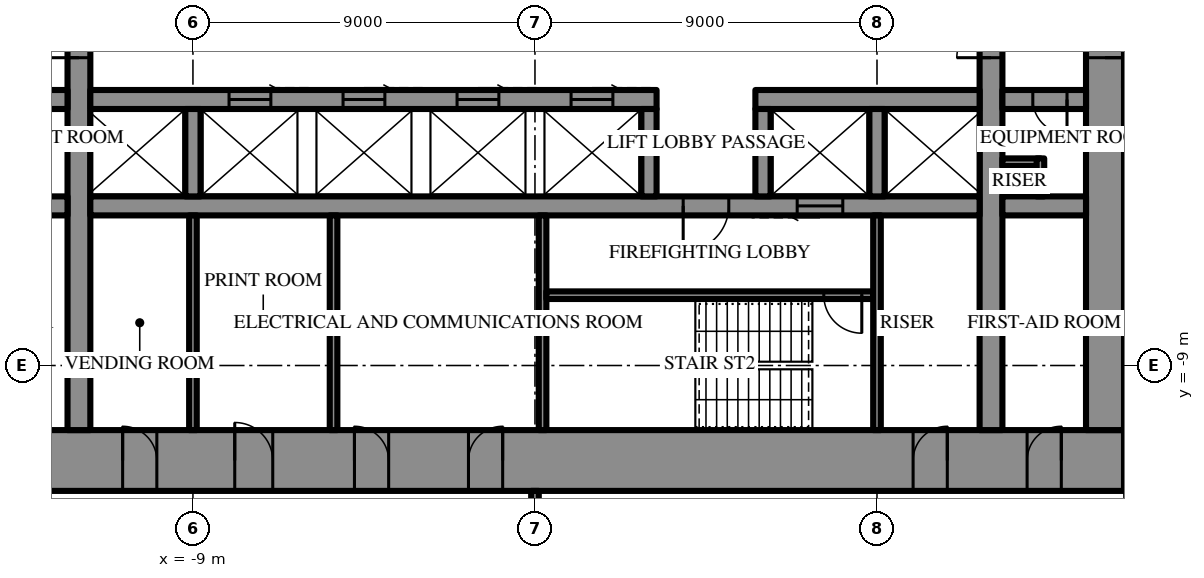
"""IFC4 building model, lengths in metres.
Left out: names, types, materials, properties, quantities, classifications, styles, units other than length and angle.
Written with IfcOpenShell. Run it as: python <this file> out.ifc"""

import sys

from ifc_helpers import new_model, si_unit, direction, frame, frame_2d, origin, place, context, subcontext, project, spatial, rectangle, extrude, element, fill, save


model = new_model("IFC4")
c1 = context("Model", 3, precision=1e-05, world=origin(), true_north=direction((0.0, 1.0)))
c2 = subcontext(c1, "Body", "Model", "MODEL_VIEW")
j1 = project(units=[si_unit("LENGTHUNIT", "METRE"), si_unit("PLANEANGLEUNIT", "RADIAN")], contexts=[c1])
p1 = place(None, origin())
s1 = spatial("IfcSite", under=j1, at=p1, CompositionType="ELEMENT")
p2 = place(p1, origin())
s2 = spatial("IfcBuilding", under=s1, at=p2, CompositionType="ELEMENT")
p3 = place(p2, frame((0.0, 0.0, 261.7)))
s3 = spatial("IfcBuildingStorey", under=s2, at=p3, CompositionType="ELEMENT", Elevation=261.7)
p4 = place(p3, frame((15.5, -11.5, 0.0), z_axis=(0.0, 0.0, 1.0), x_axis=(-1.0, 0.0, 0.0)))
e1 = element("IfcWall", 1, at=p4, inside=s3, PredefinedType="SHEAR", context=c2, shape_type="SweptSolid", body=[
    extrude(rectangle(XDim=31.0, YDim=1.6, at=frame_2d((15.5, 0.0))), origin(), (0.0, 0.0, 1.0), 4.2),
])
p5 = place(p4, frame((16.35, 0.0, 0.0)))
e2 = element("IfcOpeningElement", 2, at=p5, cuts=e1, PredefinedType="OPENING", context=c2, shape_type="SweptSolid", body=[
    extrude(rectangle(XDim=0.9, YDim=2.2, at=frame_2d((0.45, 1.1))), frame((0.0, 0.81, 0.0), z_axis=(0.0, -1.0, 0.0), x_axis=(1.0, 0.0, 0.0)), (0.0, 0.0, 1.0), 1.62),
])
p6 = place(p4, frame((19.35, 0.0, 0.0)))
e3 = element("IfcOpeningElement", 3, at=p6, cuts=e1, PredefinedType="OPENING", context=c2, shape_type="SweptSolid", body=[
    extrude(rectangle(XDim=0.9, YDim=2.2, at=frame_2d((0.45, 1.1))), frame((0.0, 0.81, 0.0), z_axis=(0.0, -1.0, 0.0), x_axis=(1.0, 0.0, 0.0)), (0.0, 0.0, 1.0), 1.62),
])
p7 = place(p4, frame((22.4, 0.0, 0.0)))
e4 = element("IfcOpeningElement", 4, at=p7, cuts=e1, PredefinedType="OPENING", context=c2, shape_type="SweptSolid", body=[
    extrude(rectangle(XDim=1.0, YDim=2.2, at=frame_2d((0.5, 1.1))), frame((0.0, 0.81, 0.0), z_axis=(0.0, -1.0, 0.0), x_axis=(1.0, 0.0, 0.0)), (0.0, 0.0, 1.0), 1.62),
])
p8 = place(p4, frame((1.65, 0.0, 0.0)))
e5 = element("IfcOpeningElement", 5, at=p8, cuts=e1, PredefinedType="OPENING", context=c2, shape_type="SweptSolid", body=[
    extrude(rectangle(XDim=0.9, YDim=2.2, at=frame_2d((0.45, 1.1))), frame((0.0, 0.81, 0.0), z_axis=(0.0, -1.0, 0.0), x_axis=(1.0, 0.0, 0.0)), (0.0, 0.0, 1.0), 1.62),
])
p9 = place(p4, frame((4.65, 0.0, 0.0)))
e6 = element("IfcOpeningElement", 6, at=p9, cuts=e1, PredefinedType="OPENING", context=c2, shape_type="SweptSolid", body=[
    extrude(rectangle(XDim=0.9, YDim=2.2, at=frame_2d((0.45, 1.1))), frame((0.0, 0.81, 0.0), z_axis=(0.0, -1.0, 0.0), x_axis=(1.0, 0.0, 0.0)), (0.0, 0.0, 1.0), 1.62),
])
p10 = place(p4, frame((25.45, 0.0, 0.0)))
e7 = element("IfcOpeningElement", 7, at=p10, cuts=e1, PredefinedType="OPENING", context=c2, shape_type="SweptSolid", body=[
    extrude(rectangle(XDim=0.9, YDim=2.2, at=frame_2d((0.45, 1.1))), frame((0.0, 0.81, 0.0), z_axis=(0.0, -1.0, 0.0), x_axis=(1.0, 0.0, 0.0)), (0.0, 0.0, 1.0), 1.62),
])
p11 = place(p4, frame((28.45, 0.0, 0.0)))
e8 = element("IfcOpeningElement", 8, at=p11, cuts=e1, PredefinedType="OPENING", context=c2, shape_type="SweptSolid", body=[
    extrude(rectangle(XDim=0.9, YDim=2.2, at=frame_2d((0.45, 1.1))), frame((0.0, 0.81, 0.0), z_axis=(0.0, -1.0, 0.0), x_axis=(1.0, 0.0, 0.0)), (0.0, 0.0, 1.0), 1.62),
])
p12 = place(p3, frame((15.0, -10.7, 0.0), z_axis=(0.0, 0.0, 1.0), x_axis=(0.0, 1.0, 0.0)))
e9 = element("IfcWall", 9, at=p12, inside=s3, PredefinedType="SHEAR", context=c2, shape_type="SweptSolid", body=[
    extrude(rectangle(XDim=21.4, YDim=1.0, at=frame_2d((10.7, 0.0))), origin(), (0.0, 0.0, 1.0), 4.2),
])
p13 = place(p12, frame((9.8, 0.0, 0.0)))
e10 = element("IfcOpeningElement", 10, at=p13, cuts=e9, PredefinedType="OPENING", context=c2, shape_type="SweptSolid", body=[
    extrude(rectangle(XDim=1.8, YDim=2.4, at=frame_2d((0.9, 1.2))), frame((0.0, 0.51, 0.0), z_axis=(0.0, -1.0, 0.0), x_axis=(1.0, 0.0, 0.0)), (0.0, 0.0, 1.0), 1.02),
])
p14 = place(p3, frame((12.0, -10.7, 0.0), z_axis=(0.0, 0.0, 1.0), x_axis=(0.0, 1.0, 0.0)))
e11 = element("IfcWall", 11, at=p14, inside=s3, PredefinedType="SHEAR", context=c2, shape_type="SweptSolid", body=[
    extrude(rectangle(XDim=21.4, YDim=0.6, at=frame_2d((10.7, 0.0))), origin(), (0.0, 0.0, 1.0), 4.2),
])
p15 = place(p14, frame((9.8, 0.0, 0.0)))
e12 = element("IfcOpeningElement", 12, at=p15, cuts=e11, PredefinedType="OPENING", context=c2, shape_type="SweptSolid", body=[
    extrude(rectangle(XDim=1.8, YDim=2.4, at=frame_2d((0.9, 1.2))), frame((0.0, 0.31, 0.0), z_axis=(0.0, -1.0, 0.0), x_axis=(1.0, 0.0, 0.0)), (0.0, 0.0, 1.0), 0.62),
])
p16 = place(p3, frame((-12.0, -10.7, 0.0), z_axis=(0.0, 0.0, 1.0), x_axis=(0.0, 1.0, 0.0)))
e13 = element("IfcWall", 13, at=p16, inside=s3, PredefinedType="SHEAR", context=c2, shape_type="SweptSolid", body=[
    extrude(rectangle(XDim=21.4, YDim=0.6, at=frame_2d((10.7, 0.0))), origin(), (0.0, 0.0, 1.0), 4.2),
])
p17 = place(p16, frame((9.8, 0.0, 0.0)))
e14 = element("IfcOpeningElement", 14, at=p17, cuts=e13, PredefinedType="OPENING", context=c2, shape_type="SweptSolid", body=[
    extrude(rectangle(XDim=1.8, YDim=2.4, at=frame_2d((0.9, 1.2))), frame((0.0, 0.31, 0.0), z_axis=(0.0, -1.0, 0.0), x_axis=(1.0, 0.0, 0.0)), (0.0, 0.0, 1.0), 0.62),
])
p18 = place(p3, frame((14.5, -2.0, 0.0), z_axis=(0.0, 0.0, 1.0), x_axis=(-1.0, 0.0, 0.0)))
e15 = element("IfcWall", 15, at=p18, inside=s3, PredefinedType="SHEAR", context=c2, shape_type="SweptSolid", body=[
    extrude(rectangle(XDim=2.2, YDim=0.5, at=frame_2d((1.1, 0.0))), origin(), (0.0, 0.0, 1.0), 4.2),
])
p19 = place(p18, frame((0.5, 0.0, 0.0)))
e16 = element("IfcOpeningElement", 16, at=p19, cuts=e15, PredefinedType="OPENING", context=c2, shape_type="SweptSolid", body=[
    extrude(rectangle(XDim=0.9, YDim=2.2, at=frame_2d((0.45, 1.1))), frame((0.0, 0.26, 0.0), z_axis=(0.0, -1.0, 0.0), x_axis=(1.0, 0.0, 0.0)), (0.0, 0.0, 1.0), 0.52),
])
p20 = place(p3, frame((11.7, -2.0, 0.0), z_axis=(0.0, 0.0, 1.0), x_axis=(-1.0, 0.0, 0.0)))
e17 = element("IfcWall", 17, at=p20, inside=s3, PredefinedType="SHEAR", context=c2, shape_type="SweptSolid", body=[
    extrude(rectangle(XDim=5.9, YDim=0.5, at=frame_2d((2.95, 0.0))), origin(), (0.0, 0.0, 1.0), 4.2),
])
p21 = place(p3, frame((3.2, -2.0, 0.0), z_axis=(0.0, 0.0, 1.0), x_axis=(-1.0, 0.0, 0.0)))
e18 = element("IfcWall", 18, at=p21, inside=s3, PredefinedType="SHEAR", context=c2, shape_type="SweptSolid", body=[
    extrude(rectangle(XDim=14.9, YDim=0.5, at=frame_2d((7.45, 0.0))), origin(), (0.0, 0.0, 1.0), 4.2),
])
p22 = place(p21, frame((1.15, 0.0, 0.0)))
e19 = element("IfcOpeningElement", 19, at=p22, cuts=e18, PredefinedType="OPENING", context=c2, shape_type="SweptSolid", body=[
    extrude(rectangle(XDim=1.1, YDim=2.2, at=frame_2d((0.55, 1.1))), frame((0.0, 0.26, 0.0), z_axis=(0.0, -1.0, 0.0), x_axis=(1.0, 0.0, 0.0)), (0.0, 0.0, 1.0), 0.52),
])
p23 = place(p21, frame((4.15, 0.0, 0.0)))
e20 = element("IfcOpeningElement", 20, at=p23, cuts=e18, PredefinedType="OPENING", context=c2, shape_type="SweptSolid", body=[
    extrude(rectangle(XDim=1.1, YDim=2.2, at=frame_2d((0.55, 1.1))), frame((0.0, 0.26, 0.0), z_axis=(0.0, -1.0, 0.0), x_axis=(1.0, 0.0, 0.0)), (0.0, 0.0, 1.0), 0.52),
])
p24 = place(p21, frame((7.15, 0.0, 0.0)))
e21 = element("IfcOpeningElement", 21, at=p24, cuts=e18, PredefinedType="OPENING", context=c2, shape_type="SweptSolid", body=[
    extrude(rectangle(XDim=1.1, YDim=2.2, at=frame_2d((0.55, 1.1))), frame((0.0, 0.26, 0.0), z_axis=(0.0, -1.0, 0.0), x_axis=(1.0, 0.0, 0.0)), (0.0, 0.0, 1.0), 0.52),
])
p25 = place(p21, frame((10.15, 0.0, 0.0)))
e22 = element("IfcOpeningElement", 22, at=p25, cuts=e18, PredefinedType="OPENING", context=c2, shape_type="SweptSolid", body=[
    extrude(rectangle(XDim=1.1, YDim=2.2, at=frame_2d((0.55, 1.1))), frame((0.0, 0.26, 0.0), z_axis=(0.0, -1.0, 0.0), x_axis=(1.0, 0.0, 0.0)), (0.0, 0.0, 1.0), 0.52),
])
p26 = place(p3, frame((-12.3, -2.0, 0.0), z_axis=(0.0, 0.0, 1.0), x_axis=(-1.0, 0.0, 0.0)))
e23 = element("IfcWall", 23, at=p26, inside=s3, PredefinedType="SHEAR", context=c2, shape_type="SweptSolid", body=[
    extrude(rectangle(XDim=2.2, YDim=0.5, at=frame_2d((1.1, 0.0))), origin(), (0.0, 0.0, 1.0), 4.2),
])
p27 = place(p26, frame((0.8, 0.0, 0.0)))
e24 = element("IfcOpeningElement", 24, at=p27, cuts=e23, PredefinedType="OPENING", context=c2, shape_type="SweptSolid", body=[
    extrude(rectangle(XDim=0.9, YDim=2.2, at=frame_2d((0.45, 1.1))), frame((0.0, 0.26, 0.0), z_axis=(0.0, -1.0, 0.0), x_axis=(1.0, 0.0, 0.0)), (0.0, 0.0, 1.0), 0.52),
])
p28 = place(p3, frame((14.5, -4.8, 0.0), z_axis=(0.0, 0.0, 1.0), x_axis=(-1.0, 0.0, 0.0)))
e25 = element("IfcWall", 25, at=p28, inside=s3, PredefinedType="SHEAR", context=c2, shape_type="SweptSolid", body=[
    extrude(rectangle(XDim=2.2, YDim=0.5, at=frame_2d((1.1, 0.0))), origin(), (0.0, 0.0, 1.0), 4.2),
])
p29 = place(p3, frame((11.7, -4.8, 0.0), z_axis=(0.0, 0.0, 1.0), x_axis=(-1.0, 0.0, 0.0)))
e26 = element("IfcWall", 26, at=p29, inside=s3, PredefinedType="SHEAR", context=c2, shape_type="SweptSolid", body=[
    extrude(rectangle(XDim=23.4, YDim=0.5, at=frame_2d((11.7, 0.0))), origin(), (0.0, 0.0, 1.0), 4.2),
])
p30 = place(p29, frame((6.6, 0.0, 0.0)))
e27 = element("IfcOpeningElement", 27, at=p30, cuts=e26, PredefinedType="OPENING", context=c2, shape_type="SweptSolid", body=[
    extrude(rectangle(XDim=1.2, YDim=2.2, at=frame_2d((0.6, 1.1))), frame((0.0, 0.26, 0.0), z_axis=(0.0, -1.0, 0.0), x_axis=(1.0, 0.0, 0.0)), (0.0, 0.0, 1.0), 0.52),
])
p31 = place(p29, frame((3.6, 0.0, 0.0)))
e28 = element("IfcOpeningElement", 28, at=p31, cuts=e26, PredefinedType="OPENING", context=c2, shape_type="SweptSolid", body=[
    extrude(rectangle(XDim=1.2, YDim=2.2, at=frame_2d((0.6, 1.1))), frame((0.0, 0.26, 0.0), z_axis=(0.0, -1.0, 0.0), x_axis=(1.0, 0.0, 0.0)), (0.0, 0.0, 1.0), 0.52),
])
p32 = place(p3, frame((-12.3, -4.8, 0.0), z_axis=(0.0, 0.0, 1.0), x_axis=(-1.0, 0.0, 0.0)))
e29 = element("IfcWall", 29, at=p32, inside=s3, PredefinedType="SHEAR", context=c2, shape_type="SweptSolid", body=[
    extrude(rectangle(XDim=2.2, YDim=0.5, at=frame_2d((1.1, 0.0))), origin(), (0.0, 0.0, 1.0), 4.2),
])
for number, where, z_axis, x_axis in (
    (30, (9.0, -2.25, 0.0), (0.0, 0.0, 1.0), (0.0, -1.0, 0.0)),
    (31, (6.0, -2.25, 0.0), (0.0, 0.0, 1.0), (0.0, -1.0, 0.0)),
    (32, (3.0, -2.25, 0.0), (0.0, 0.0, 1.0), (0.0, -1.0, 0.0)),
    (33, (-9.0, -2.25, 0.0), (0.0, 0.0, 1.0), (0.0, -1.0, 0.0)),
):
    element("IfcWall", number, at=place(p3, frame(where, z_axis=z_axis, x_axis=x_axis)), inside=s3, PredefinedType="SHEAR", context=c2, shape_type="SweptSolid", body=[
        extrude(rectangle(XDim=2.3, YDim=0.4, at=frame_2d((1.15, 0.0))), origin(), (0.0, 0.0, 1.0), 4.2),
    ])
p33 = place(p3, frame((0.2, -5.05, 0.0), z_axis=(0.0, 0.0, 1.0), x_axis=(0.0, -1.0, 0.0)))
e34 = element("IfcWall", 34, at=p33, inside=s3, PredefinedType="SHEAR", context=c2, shape_type="SweptSolid", body=[
    extrude(rectangle(XDim=5.65, YDim=0.2, at=frame_2d((2.825, 0.0))), origin(), (0.0, 0.0, 1.0), 4.2),
])
p34 = place(p3, frame((8.9, -7.15, 0.0), z_axis=(0.0, 0.0, 1.0), x_axis=(-1.0, 0.0, 0.0)))
e35 = element("IfcWall", 35, at=p34, inside=s3, PredefinedType="SHEAR", context=c2, shape_type="SweptSolid", body=[
    extrude(rectangle(XDim=8.6, YDim=0.2, at=frame_2d((4.3, 0.0))), origin(), (0.0, 0.0, 1.0), 4.2),
])
p35 = place(p34, frame((0.3, 0.0, 0.0)))
e36 = element("IfcOpeningElement", 36, at=p35, cuts=e35, PredefinedType="OPENING", context=c2, shape_type="SweptSolid", body=[
    extrude(rectangle(XDim=1.0, YDim=2.2, at=frame_2d((0.5, 1.1))), frame((0.0, 0.11, 0.0), z_axis=(0.0, -1.0, 0.0), x_axis=(1.0, 0.0, 0.0)), (0.0, 0.0, 1.0), 0.22),
])
for number, where, z_axis, x_axis in (
    (37, (9.0, -5.05, 0.0), (0.0, 0.0, 1.0), (0.0, -1.0, 0.0)),
    (38, (-9.0, -5.05, 0.0), (0.0, 0.0, 1.0), (0.0, -1.0, 0.0)),
    (39, (-5.3, -5.05, 0.0), (0.0, 0.0, 1.0), (0.0, -1.0, 0.0)),
):
    element("IfcWall", number, at=place(p3, frame(where, z_axis=z_axis, x_axis=x_axis)), inside=s3, PredefinedType="PARTITIONING", context=c2, shape_type="SweptSolid", body=[
        extrude(rectangle(XDim=5.65, YDim=0.2, at=frame_2d((2.825, 0.0))), origin(), (0.0, 0.0, 1.0), 4.0),
    ])
for number, where, z_axis, x_axis in (
    (40, (13.3, -3.65, 0.0), (0.0, 0.0, 1.0), (-1.0, 0.0, 0.0)),
    (41, (13.3, -3.55, 0.0), (0.0, 0.0, 1.0), (0.0, -1.0, 0.0)),
):
    element("IfcWall", number, at=place(p3, frame(where, z_axis=z_axis, x_axis=x_axis)), inside=s3, PredefinedType="PARTITIONING", context=c2, shape_type="SweptSolid", body=[
        extrude(rectangle(XDim=1.0, YDim=0.2, at=frame_2d((0.5, 0.0))), origin(), (0.0, 0.0, 1.0), 4.0),
    ])
p36 = place(p3, frame((0.0, -12.3, 0.0), z_axis=(0.0, 0.0, 1.0), x_axis=(0.0, -1.0, 0.0)))
e42 = element("IfcWall", 42, at=p36, inside=s3, PredefinedType="PARTITIONING", context=c2, shape_type="SweptSolid", body=[
    extrude(rectangle(XDim=1.7, YDim=0.2, at=frame_2d((0.85, 0.0))), origin(), (0.0, 0.0, 1.0), 2.992),
])
p37 = place(p36, frame((0.35, 0.0, 0.0)))
e43 = element("IfcOpeningElement", 43, at=p37, cuts=e42, PredefinedType="OPENING", context=c2, shape_type="SweptSolid", body=[
    extrude(rectangle(XDim=1.0, YDim=2.2, at=frame_2d((0.5, 1.1))), frame((0.0, 0.11, 0.0), z_axis=(0.0, -1.0, 0.0), x_axis=(1.0, 0.0, 0.0)), (0.0, 0.0, 1.0), 0.22),
])
p38 = place(p13, frame((1.8, 0.0, 0.0), z_axis=(0.0, 0.0, 1.0), x_axis=(-1.0, 0.0, 0.0)))
e44 = element("IfcDoor", 44, at=p38, inside=s3, OperationType="DOUBLE_DOOR_SINGLE_SWING", PredefinedType="DOOR", context=c2, shape_type="SweptSolid", body=[
    extrude(rectangle(XDim=1.8, YDim=2.4, at=frame_2d((0.9, 1.2))), frame((0.0, 0.025, 0.0), z_axis=(0.0, -1.0, 0.0), x_axis=(1.0, 0.0, 0.0)), (0.0, 0.0, 1.0), 0.05),
])
fill(e10, e44)
p39 = place(p30, origin())
e45 = element("IfcDoor", 45, at=p39, inside=s3, OperationType="SINGLE_SWING_LEFT", PredefinedType="DOOR", context=c2, shape_type="SweptSolid", body=[
    extrude(rectangle(XDim=1.2, YDim=2.2, at=frame_2d((0.6, 1.1))), frame((0.0, 0.025, 0.0), z_axis=(0.0, -1.0, 0.0), x_axis=(1.0, 0.0, 0.0)), (0.0, 0.0, 1.0), 0.05),
])
fill(e27, e45)
p40 = place(p35, origin())
e46 = element("IfcDoor", 46, at=p40, inside=s3, OperationType="SINGLE_SWING_RIGHT", PredefinedType="DOOR", context=c2, shape_type="SweptSolid", body=[
    extrude(rectangle(XDim=1.0, YDim=2.2, at=frame_2d((0.5, 1.1))), frame((0.0, 0.025, 0.0), z_axis=(0.0, -1.0, 0.0), x_axis=(1.0, 0.0, 0.0)), (0.0, 0.0, 1.0), 0.05),
])
fill(e36, e46)
p41 = place(p5, frame((0.9, 0.0, 0.0), z_axis=(0.0, 0.0, 1.0), x_axis=(-1.0, 0.0, 0.0)))
e47 = element("IfcDoor", 47, at=p41, inside=s3, OperationType="SINGLE_SWING_LEFT", PredefinedType="DOOR", context=c2, shape_type="SweptSolid", body=[
    extrude(rectangle(XDim=0.9, YDim=2.2, at=frame_2d((0.45, 1.1))), frame((0.0, 0.025, 0.0), z_axis=(0.0, -1.0, 0.0), x_axis=(1.0, 0.0, 0.0)), (0.0, 0.0, 1.0), 0.05),
])
fill(e2, e47)
p42 = place(p6, frame((0.9, 0.0, 0.0), z_axis=(0.0, 0.0, 1.0), x_axis=(-1.0, 0.0, 0.0)))
e48 = element("IfcDoor", 48, at=p42, inside=s3, OperationType="SINGLE_SWING_RIGHT", PredefinedType="DOOR", context=c2, shape_type="SweptSolid", body=[
    extrude(rectangle(XDim=0.9, YDim=2.2, at=frame_2d((0.45, 1.1))), frame((0.0, 0.025, 0.0), z_axis=(0.0, -1.0, 0.0), x_axis=(1.0, 0.0, 0.0)), (0.0, 0.0, 1.0), 0.05),
])
fill(e3, e48)
p43 = place(p7, frame((1.0, 0.0, 0.0), z_axis=(0.0, 0.0, 1.0), x_axis=(-1.0, 0.0, 0.0)))
e49 = element("IfcDoor", 49, at=p43, inside=s3, OperationType="SINGLE_SWING_RIGHT", PredefinedType="DOOR", context=c2, shape_type="SweptSolid", body=[
    extrude(rectangle(XDim=1.0, YDim=2.2, at=frame_2d((0.5, 1.1))), frame((0.0, 0.025, 0.0), z_axis=(0.0, -1.0, 0.0), x_axis=(1.0, 0.0, 0.0)), (0.0, 0.0, 1.0), 0.05),
])
fill(e4, e49)
p44 = place(p8, frame((0.9, 0.0, 0.0), z_axis=(0.0, 0.0, 1.0), x_axis=(-1.0, 0.0, 0.0)))
e50 = element("IfcDoor", 50, at=p44, inside=s3, OperationType="SINGLE_SWING_LEFT", PredefinedType="DOOR", context=c2, shape_type="SweptSolid", body=[
    extrude(rectangle(XDim=0.9, YDim=2.2, at=frame_2d((0.45, 1.1))), frame((0.0, 0.025, 0.0), z_axis=(0.0, -1.0, 0.0), x_axis=(1.0, 0.0, 0.0)), (0.0, 0.0, 1.0), 0.05),
])
fill(e5, e50)
p45 = place(p9, frame((0.9, 0.0, 0.0), z_axis=(0.0, 0.0, 1.0), x_axis=(-1.0, 0.0, 0.0)))
e51 = element("IfcDoor", 51, at=p45, inside=s3, OperationType="SINGLE_SWING_LEFT", PredefinedType="DOOR", context=c2, shape_type="SweptSolid", body=[
    extrude(rectangle(XDim=0.9, YDim=2.2, at=frame_2d((0.45, 1.1))), frame((0.0, 0.025, 0.0), z_axis=(0.0, -1.0, 0.0), x_axis=(1.0, 0.0, 0.0)), (0.0, 0.0, 1.0), 0.05),
])
fill(e6, e51)
p46 = place(p10, frame((0.9, 0.0, 0.0), z_axis=(0.0, 0.0, 1.0), x_axis=(-1.0, 0.0, 0.0)))
e52 = element("IfcDoor", 52, at=p46, inside=s3, OperationType="SINGLE_SWING_RIGHT", PredefinedType="DOOR", context=c2, shape_type="SweptSolid", body=[
    extrude(rectangle(XDim=0.9, YDim=2.2, at=frame_2d((0.45, 1.1))), frame((0.0, 0.025, 0.0), z_axis=(0.0, -1.0, 0.0), x_axis=(1.0, 0.0, 0.0)), (0.0, 0.0, 1.0), 0.05),
])
fill(e7, e52)
p47 = place(p19, origin())
e53 = element("IfcDoor", 53, at=p47, inside=s3, OperationType="SINGLE_SWING_RIGHT", PredefinedType="DOOR", context=c2, shape_type="SweptSolid", body=[
    extrude(rectangle(XDim=0.9, YDim=2.2, at=frame_2d((0.45, 1.1))), frame((0.0, 0.025, 0.0), z_axis=(0.0, -1.0, 0.0), x_axis=(1.0, 0.0, 0.0)), (0.0, 0.0, 1.0), 0.05),
])
fill(e16, e53)
p48 = place(p15, origin())
e54 = element("IfcDoor", 54, at=p48, inside=s3, OperationType="DOUBLE_DOOR_SINGLE_SWING", PredefinedType="DOOR", context=c2, shape_type="SweptSolid", body=[
    extrude(rectangle(XDim=1.8, YDim=2.4, at=frame_2d((0.9, 1.2))), frame((0.0, 0.025, 0.0), z_axis=(0.0, -1.0, 0.0), x_axis=(1.0, 0.0, 0.0)), (0.0, 0.0, 1.0), 0.05),
])
fill(e12, e54)
p49 = place(p17, origin())
e55 = element("IfcDoor", 55, at=p49, inside=s3, OperationType="DOUBLE_DOOR_SINGLE_SWING", PredefinedType="DOOR", context=c2, shape_type="SweptSolid", body=[
    extrude(rectangle(XDim=1.8, YDim=2.4, at=frame_2d((0.9, 1.2))), frame((0.0, 0.025, 0.0), z_axis=(0.0, -1.0, 0.0), x_axis=(1.0, 0.0, 0.0)), (0.0, 0.0, 1.0), 0.05),
])
fill(e14, e55)
p50 = place(p31, origin())
e56 = element("IfcDoor", 56, at=p50, inside=s3, OperationType="SLIDING_TO_LEFT", PredefinedType="DOOR", context=c2, shape_type="SweptSolid", body=[
    extrude(rectangle(XDim=1.2, YDim=2.2, at=frame_2d((0.6, 1.1))), frame((0.0, 0.025, 0.0), z_axis=(0.0, -1.0, 0.0), x_axis=(1.0, 0.0, 0.0)), (0.0, 0.0, 1.0), 0.05),
])
fill(e28, e56)
p51 = place(p22, frame((1.1, 0.0, 0.0), z_axis=(0.0, 0.0, 1.0), x_axis=(-1.0, 0.0, 0.0)))
e57 = element("IfcDoor", 57, at=p51, inside=s3, OperationType="SLIDING_TO_LEFT", PredefinedType="DOOR", context=c2, shape_type="SweptSolid", body=[
    extrude(rectangle(XDim=1.1, YDim=2.2, at=frame_2d((0.55, 1.1))), frame((0.0, 0.025, 0.0), z_axis=(0.0, -1.0, 0.0), x_axis=(1.0, 0.0, 0.0)), (0.0, 0.0, 1.0), 0.05),
])
fill(e19, e57)
p52 = place(p23, frame((1.1, 0.0, 0.0), z_axis=(0.0, 0.0, 1.0), x_axis=(-1.0, 0.0, 0.0)))
e58 = element("IfcDoor", 58, at=p52, inside=s3, OperationType="SLIDING_TO_LEFT", PredefinedType="DOOR", context=c2, shape_type="SweptSolid", body=[
    extrude(rectangle(XDim=1.1, YDim=2.2, at=frame_2d((0.55, 1.1))), frame((0.0, 0.025, 0.0), z_axis=(0.0, -1.0, 0.0), x_axis=(1.0, 0.0, 0.0)), (0.0, 0.0, 1.0), 0.05),
])
fill(e20, e58)
p53 = place(p24, frame((1.1, 0.0, 0.0), z_axis=(0.0, 0.0, 1.0), x_axis=(-1.0, 0.0, 0.0)))
e59 = element("IfcDoor", 59, at=p53, inside=s3, OperationType="SLIDING_TO_LEFT", PredefinedType="DOOR", context=c2, shape_type="SweptSolid", body=[
    extrude(rectangle(XDim=1.1, YDim=2.2, at=frame_2d((0.55, 1.1))), frame((0.0, 0.025, 0.0), z_axis=(0.0, -1.0, 0.0), x_axis=(1.0, 0.0, 0.0)), (0.0, 0.0, 1.0), 0.05),
])
fill(e21, e59)
p54 = place(p25, frame((1.1, 0.0, 0.0), z_axis=(0.0, 0.0, 1.0), x_axis=(-1.0, 0.0, 0.0)))
e60 = element("IfcDoor", 60, at=p54, inside=s3, OperationType="SLIDING_TO_LEFT", PredefinedType="DOOR", context=c2, shape_type="SweptSolid", body=[
    extrude(rectangle(XDim=1.1, YDim=2.2, at=frame_2d((0.55, 1.1))), frame((0.0, 0.025, 0.0), z_axis=(0.0, -1.0, 0.0), x_axis=(1.0, 0.0, 0.0)), (0.0, 0.0, 1.0), 0.05),
])
fill(e22, e60)
save(model, sys.argv[1])
